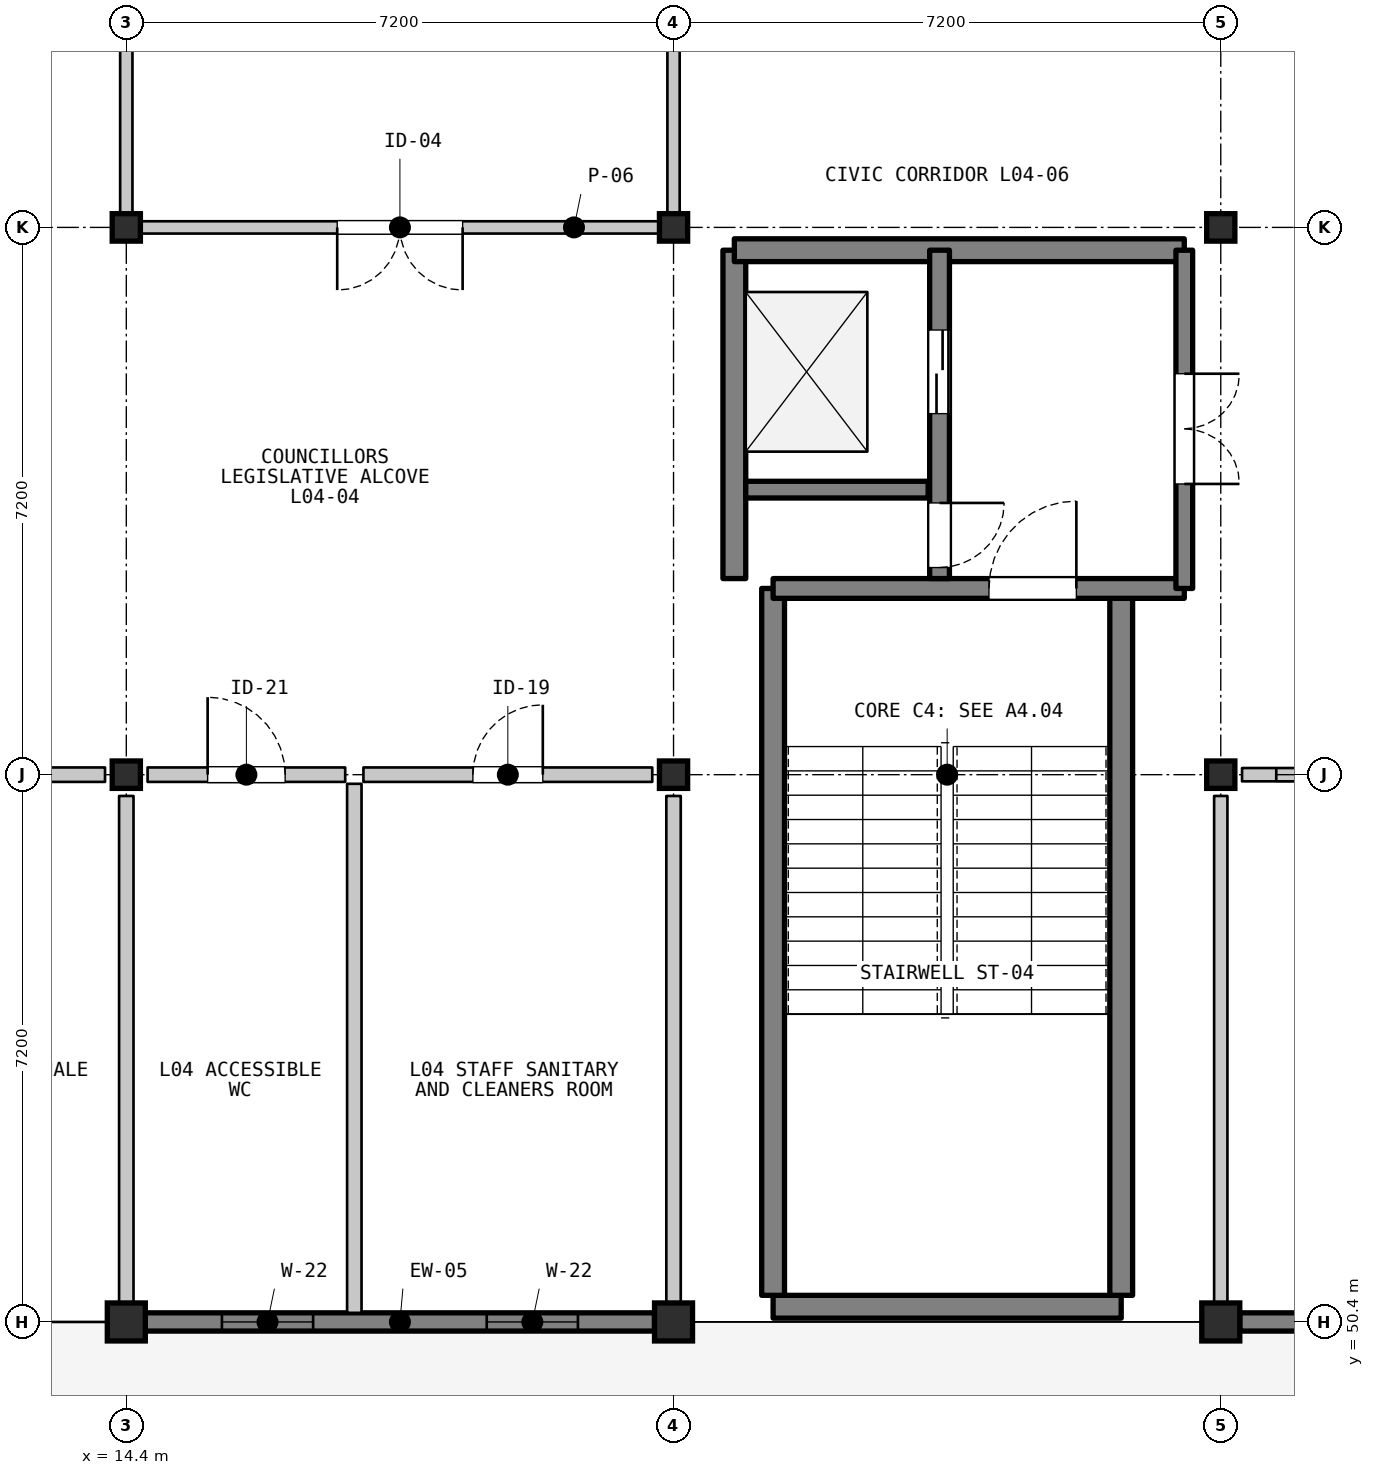
"""IFC4 building model, lengths in metres.
Left out: names, types, materials, properties, quantities, classifications, styles, units other than length and angle.
Written with IfcOpenShell. Run it as: python <this file> out.ifc"""

import sys

from ifc_helpers import new_model, si_unit, direction, frame, frame_2d, origin, origin_2d, place, context, subcontext, project, spatial, rectangle, i_section, extrude, element, fill, save


model = new_model("IFC4")
c1 = context("Model", 3, precision=1e-05, world=origin(), true_north=direction((0.0, 1.0)))
c2 = subcontext(c1, "Body", "Model", "MODEL_VIEW")
j1 = project(units=[si_unit("LENGTHUNIT", "METRE"), si_unit("PLANEANGLEUNIT", "RADIAN")], contexts=[c1])
p1 = place(None, origin())
s1 = spatial("IfcSite", under=j1, at=p1, CompositionType="ELEMENT")
p2 = place(p1, origin())
s2 = spatial("IfcBuilding", under=s1, at=p2, CompositionType="ELEMENT")
p3 = place(p2, frame((0.0, 0.0, 14.1)))
s3 = spatial("IfcBuildingStorey", under=s2, at=p3, CompositionType="ELEMENT", Elevation=14.1)
p4 = place(p3, frame((14.4, 50.4, 0.0), z_axis=(0.0, 0.0, 1.0), x_axis=(1.0, 0.0, 0.0)))
e1 = element("IfcColumn", 1, at=p4, inside=s3, PredefinedType="COLUMN", context=c2, shape_type="SweptSolid", body=[
    extrude(rectangle(XDim=0.5, YDim=0.5, at=origin_2d()), origin(), (0.0, 0.0, 1.0), 3.9),
])
for number, where, z_axis, x_axis in (
    (2, (14.4, 57.6, 0.0), (0.0, 0.0, 1.0), (1.0, 0.0, 0.0)),
    (3, (14.4, 64.8, 0.0), (0.0, 0.0, 1.0), (1.0, 0.0, 0.0)),
):
    element("IfcColumn", number, at=place(p3, frame(where, z_axis=z_axis, x_axis=x_axis)), inside=s3, PredefinedType="COLUMN", context=c2, shape_type="SweptSolid", body=[
        extrude(i_section(OverallWidth=0.371, OverallDepth=0.361, WebThickness=0.012, FlangeThickness=0.02, FilletRadius=0.015, at=origin_2d()), origin(), (0.0, 0.0, 1.0), 3.9),
    ])
p5 = place(p3, frame((21.6, 50.4, 0.0), z_axis=(0.0, 0.0, 1.0), x_axis=(1.0, 0.0, 0.0)))
e4 = element("IfcColumn", 4, at=p5, inside=s3, PredefinedType="COLUMN", context=c2, shape_type="SweptSolid", body=[
    extrude(rectangle(XDim=0.5, YDim=0.5, at=origin_2d()), origin(), (0.0, 0.0, 1.0), 3.9),
])
for number, where, z_axis, x_axis in (
    (5, (21.6, 57.6, 0.0), (0.0, 0.0, 1.0), (1.0, 0.0, 0.0)),
    (6, (21.6, 64.8, 0.0), (0.0, 0.0, 1.0), (1.0, 0.0, 0.0)),
):
    element("IfcColumn", number, at=place(p3, frame(where, z_axis=z_axis, x_axis=x_axis)), inside=s3, PredefinedType="COLUMN", context=c2, shape_type="SweptSolid", body=[
        extrude(i_section(OverallWidth=0.371, OverallDepth=0.361, WebThickness=0.012, FlangeThickness=0.02, FilletRadius=0.015, at=origin_2d()), origin(), (0.0, 0.0, 1.0), 3.9),
    ])
p6 = place(p3, frame((28.8, 50.4, 0.0), z_axis=(0.0, 0.0, 1.0), x_axis=(1.0, 0.0, 0.0)))
e7 = element("IfcColumn", 7, at=p6, inside=s3, PredefinedType="COLUMN", context=c2, shape_type="SweptSolid", body=[
    extrude(rectangle(XDim=0.5, YDim=0.5, at=origin_2d()), origin(), (0.0, 0.0, 1.0), 3.9),
])
for number, where, z_axis, x_axis in (
    (8, (28.8, 57.6, 0.0), (0.0, 0.0, 1.0), (1.0, 0.0, 0.0)),
    (9, (28.8, 64.8, 0.0), (0.0, 0.0, 1.0), (1.0, 0.0, 0.0)),
):
    element("IfcColumn", number, at=place(p3, frame(where, z_axis=z_axis, x_axis=x_axis)), inside=s3, PredefinedType="COLUMN", context=c2, shape_type="SweptSolid", body=[
        extrude(i_section(OverallWidth=0.371, OverallDepth=0.361, WebThickness=0.012, FlangeThickness=0.02, FilletRadius=0.015, at=origin_2d()), origin(), (0.0, 0.0, 1.0), 3.9),
    ])
p7 = place(p3, frame((21.35, 50.4, 0.0), z_axis=(0.0, 0.0, 1.0), x_axis=(-1.0, 0.0, 0.0)))
e10 = element("IfcWall", 10, at=p7, inside=s3, PredefinedType="SOLIDWALL", context=c2, shape_type="SweptSolid", body=[
    extrude(rectangle(XDim=6.7, YDim=0.24, at=frame_2d((3.35, 0.0))), origin(), (0.0, 0.0, 1.0), 3.118),
])
p8 = place(p7, frame((1.008, 0.0, 0.95)))
e11 = element("IfcOpeningElement", 11, at=p8, cuts=e10, PredefinedType="OPENING", context=c2, shape_type="SweptSolid", body=[
    extrude(rectangle(XDim=1.2, YDim=1.7, at=frame_2d((0.6, 0.85))), frame((0.0, 0.13, 0.0), z_axis=(0.0, -1.0, 0.0), x_axis=(1.0, 0.0, 0.0)), (0.0, 0.0, 1.0), 0.26),
])
p9 = place(p7, frame((4.492, 0.0, 0.95)))
e12 = element("IfcOpeningElement", 12, at=p9, cuts=e10, PredefinedType="OPENING", context=c2, shape_type="SweptSolid", body=[
    extrude(rectangle(XDim=1.2, YDim=1.7, at=frame_2d((0.6, 0.85))), frame((0.0, 0.13, 0.0), z_axis=(0.0, -1.0, 0.0), x_axis=(1.0, 0.0, 0.0)), (0.0, 0.0, 1.0), 0.26),
])
p10 = place(p3, frame((35.75, 50.4, 0.0), z_axis=(0.0, 0.0, 1.0), x_axis=(-1.0, 0.0, 0.0)))
e13 = element("IfcWall", 13, at=p10, inside=s3, PredefinedType="SOLIDWALL", context=c2, shape_type="SweptSolid", body=[
    extrude(rectangle(XDim=6.7, YDim=0.24, at=frame_2d((3.35, 0.0))), origin(), (0.0, 0.0, 1.0), 3.118),
])
p11 = place(p3, frame((22.91, 50.6, 0.0), z_axis=(0.0, 0.0, 1.0), x_axis=(1.0, 0.0, 0.0)))
e14 = element("IfcWall", 14, at=p11, inside=s3, PredefinedType="SHEAR", context=c2, shape_type="SweptSolid", body=[
    extrude(rectangle(XDim=4.58, YDim=0.3, at=frame_2d((2.29, 0.0))), origin(), (0.0, 0.0, 1.0), 3.72),
])
for number, where, z_axis, x_axis in (
    (15, (22.91, 50.75, 0.0), (0.0, 0.0, 1.0), (0.0, 1.0, 0.0)),
    (16, (27.49, 50.75, 0.0), (0.0, 0.0, 1.0), (0.0, 1.0, 0.0)),
):
    element("IfcWall", number, at=place(p3, frame(where, z_axis=z_axis, x_axis=x_axis)), inside=s3, PredefinedType="SHEAR", context=c2, shape_type="SweptSolid", body=[
        extrude(rectangle(XDim=9.3, YDim=0.3, at=frame_2d((4.65, 0.0))), origin(), (0.0, 0.0, 1.0), 3.72),
    ])
p12 = place(p3, frame((22.91, 60.05, 0.0), z_axis=(0.0, 0.0, 1.0), x_axis=(1.0, 0.0, 0.0)))
e17 = element("IfcWall", 17, at=p12, inside=s3, PredefinedType="SHEAR", context=c2, shape_type="SweptSolid", body=[
    extrude(rectangle(XDim=5.41, YDim=0.26, at=frame_2d((2.705, 0.0))), origin(), (0.0, 0.0, 1.0), 3.72),
])
p13 = place(p12, frame((2.84, 0.0, 0.0)))
e18 = element("IfcOpeningElement", 18, at=p13, cuts=e17, PredefinedType="OPENING", context=c2, shape_type="SweptSolid", body=[
    extrude(rectangle(XDim=1.15, YDim=2.15, at=frame_2d((0.575, 1.075))), frame((0.0, 0.14, 0.0), z_axis=(0.0, -1.0, 0.0), x_axis=(1.0, 0.0, 0.0)), (0.0, 0.0, 1.0), 0.28),
])
p14 = place(p3, frame((22.4, 60.18, 0.0), z_axis=(0.0, 0.0, 1.0), x_axis=(0.0, 1.0, 0.0)))
e19 = element("IfcWall", 19, at=p14, inside=s3, PredefinedType="SHEAR", context=c2, shape_type="SweptSolid", body=[
    extrude(rectangle(XDim=4.32, YDim=0.3, at=frame_2d((2.16, 0.0))), origin(), (0.0, 0.0, 1.0), 3.72),
])
p15 = place(p3, frame((22.4, 64.5, 0.0), z_axis=(0.0, 0.0, 1.0), x_axis=(1.0, 0.0, 0.0)))
e20 = element("IfcWall", 20, at=p15, inside=s3, PredefinedType="SHEAR", context=c2, shape_type="SweptSolid", body=[
    extrude(rectangle(XDim=5.92, YDim=0.3, at=frame_2d((2.96, 0.0))), origin(), (0.0, 0.0, 1.0), 3.72),
])
p16 = place(p3, frame((22.55, 61.35, 0.0), z_axis=(0.0, 0.0, 1.0), x_axis=(1.0, 0.0, 0.0)))
e21 = element("IfcWall", 21, at=p16, inside=s3, PredefinedType="SHEAR", context=c2, shape_type="SweptSolid", body=[
    extrude(rectangle(XDim=2.4, YDim=0.22, at=frame_2d((1.2, 0.0))), origin(), (0.0, 0.0, 1.0), 3.72),
])
p17 = place(p3, frame((25.1, 64.5, 0.0), z_axis=(0.0, 0.0, 1.0), x_axis=(0.0, -1.0, 0.0)))
e22 = element("IfcWall", 22, at=p17, inside=s3, PredefinedType="SHEAR", context=c2, shape_type="SweptSolid", body=[
    extrude(rectangle(XDim=4.32, YDim=0.26, at=frame_2d((2.16, 0.0))), origin(), (0.0, 0.0, 1.0), 3.72),
])
p18 = place(p17, frame((1.05, 0.0, 0.0)))
e23 = element("IfcOpeningElement", 23, at=p18, cuts=e22, PredefinedType="OPENING", context=c2, shape_type="SweptSolid", body=[
    extrude(rectangle(XDim=1.1, YDim=2.15, at=frame_2d((0.55, 1.075))), frame((0.0, 0.14, 0.0), z_axis=(0.0, -1.0, 0.0), x_axis=(1.0, 0.0, 0.0)), (0.0, 0.0, 1.0), 0.28),
])
p19 = place(p17, frame((3.325, 0.0, 0.0)))
e24 = element("IfcOpeningElement", 24, at=p19, cuts=e22, PredefinedType="OPENING", context=c2, shape_type="SweptSolid", body=[
    extrude(rectangle(XDim=0.85, YDim=2.05, at=frame_2d((0.425, 1.025))), frame((0.0, 0.14, 0.0), z_axis=(0.0, -1.0, 0.0), x_axis=(1.0, 0.0, 0.0)), (0.0, 0.0, 1.0), 0.28),
])
p20 = place(p3, frame((28.32, 64.5, 0.0), z_axis=(0.0, 0.0, 1.0), x_axis=(0.0, -1.0, 0.0)))
e25 = element("IfcWall", 25, at=p20, inside=s3, PredefinedType="SHEAR", context=c2, shape_type="SweptSolid", body=[
    extrude(rectangle(XDim=4.45, YDim=0.22, at=frame_2d((2.225, 0.0))), origin(), (0.0, 0.0, 1.0), 3.72),
])
p21 = place(p20, frame((1.625, 0.0, 0.0)))
e26 = element("IfcOpeningElement", 26, at=p21, cuts=e25, PredefinedType="OPENING", context=c2, shape_type="SweptSolid", body=[
    extrude(rectangle(XDim=1.45, YDim=2.2, at=frame_2d((0.725, 1.1))), frame((0.0, 0.12, 0.0), z_axis=(0.0, -1.0, 0.0), x_axis=(1.0, 0.0, 0.0)), (0.0, 0.0, 1.0), 0.24),
])
p22 = place(p3, frame((10.92, 57.6, 0.0), z_axis=(0.0, 0.0, 1.0), x_axis=(1.0, 0.0, 0.0)))
e27 = element("IfcWall", 27, at=p22, inside=s3, PredefinedType="PARTITIONING", context=c2, shape_type="SweptSolid", body=[
    extrude(rectangle(XDim=3.2, YDim=0.19, at=frame_2d((1.6, 0.0))), origin(), (0.0, 0.0, 1.0), 3.088),
])
p23 = place(p22, frame((1.14, 0.0, 0.0)))
e28 = element("IfcOpeningElement", 28, at=p23, cuts=e27, PredefinedType="OPENING", context=c2, shape_type="SweptSolid", body=[
    extrude(rectangle(XDim=0.92, YDim=2.1, at=frame_2d((0.46, 1.05))), frame((0.0, 0.105, 0.0), z_axis=(0.0, -1.0, 0.0), x_axis=(1.0, 0.0, 0.0)), (0.0, 0.0, 1.0), 0.21),
])
p24 = place(p3, frame((14.4, 57.32, 0.0), z_axis=(0.0, 0.0, 1.0), x_axis=(0.0, -1.0, 0.0)))
e29 = element("IfcWall", 29, at=p24, inside=s3, PredefinedType="PARTITIONING", context=c2, shape_type="SweptSolid", body=[
    extrude(rectangle(XDim=6.8, YDim=0.19, at=frame_2d((3.4, 0.0))), origin(), (0.0, 0.0, 1.0), 3.088),
])
p25 = place(p3, frame((14.68, 57.6, 0.0), z_axis=(0.0, 0.0, 1.0), x_axis=(1.0, 0.0, 0.0)))
e30 = element("IfcWall", 30, at=p25, inside=s3, PredefinedType="PARTITIONING", context=c2, shape_type="SweptSolid", body=[
    extrude(rectangle(XDim=2.6, YDim=0.19, at=frame_2d((1.3, 0.0))), origin(), (0.0, 0.0, 1.0), 3.108),
])
p26 = place(p25, frame((0.79, 0.0, 0.0)))
e31 = element("IfcOpeningElement", 31, at=p26, cuts=e30, PredefinedType="OPENING", context=c2, shape_type="SweptSolid", body=[
    extrude(rectangle(XDim=1.02, YDim=2.15, at=frame_2d((0.51, 1.075))), frame((0.0, 0.105, 0.0), z_axis=(0.0, -1.0, 0.0), x_axis=(1.0, 0.0, 0.0)), (0.0, 0.0, 1.0), 0.21),
])
p27 = place(p3, frame((17.4, 57.48, 0.0), z_axis=(0.0, 0.0, 1.0), x_axis=(0.0, -1.0, 0.0)))
e32 = element("IfcWall", 32, at=p27, inside=s3, PredefinedType="PARTITIONING", context=c2, shape_type="SweptSolid", body=[
    extrude(rectangle(XDim=6.96, YDim=0.19, at=frame_2d((3.48, 0.0))), origin(), (0.0, 0.0, 1.0), 3.108),
])
p28 = place(p3, frame((17.52, 57.6, 0.0), z_axis=(0.0, 0.0, 1.0), x_axis=(1.0, 0.0, 0.0)))
e33 = element("IfcWall", 33, at=p28, inside=s3, PredefinedType="PARTITIONING", context=c2, shape_type="SweptSolid", body=[
    extrude(rectangle(XDim=3.8, YDim=0.19, at=frame_2d((1.9, 0.0))), origin(), (0.0, 0.0, 1.0), 3.108),
])
p29 = place(p28, frame((1.44, 0.0, 0.0)))
e34 = element("IfcOpeningElement", 34, at=p29, cuts=e33, PredefinedType="OPENING", context=c2, shape_type="SweptSolid", body=[
    extrude(rectangle(XDim=0.92, YDim=2.1, at=frame_2d((0.46, 1.05))), frame((0.0, 0.105, 0.0), z_axis=(0.0, -1.0, 0.0), x_axis=(1.0, 0.0, 0.0)), (0.0, 0.0, 1.0), 0.21),
])
p30 = place(p3, frame((21.6, 57.32, 0.0), z_axis=(0.0, 0.0, 1.0), x_axis=(0.0, -1.0, 0.0)))
e35 = element("IfcWall", 35, at=p30, inside=s3, PredefinedType="PARTITIONING", context=c2, shape_type="SweptSolid", body=[
    extrude(rectangle(XDim=6.8, YDim=0.19, at=frame_2d((3.4, 0.0))), origin(), (0.0, 0.0, 1.0), 3.108),
])
p31 = place(p3, frame((21.48, 64.8, 0.0), z_axis=(0.0, 0.0, 1.0), x_axis=(-1.0, 0.0, 0.0)))
e36 = element("IfcWall", 36, at=p31, inside=s3, PredefinedType="PARTITIONING", context=c2, shape_type="SweptSolid", body=[
    extrude(rectangle(XDim=6.96, YDim=0.162, at=frame_2d((3.48, 0.0))), origin(), (0.0, 0.0, 1.0), 3.108),
])
p32 = place(p31, frame((2.655, 0.0, 0.0)))
e37 = element("IfcOpeningElement", 37, at=p32, cuts=e36, PredefinedType="OPENING", context=c2, shape_type="SweptSolid", body=[
    extrude(rectangle(XDim=1.65, YDim=2.35, at=frame_2d((0.825, 1.175))), frame((0.0, 0.091, 0.0), z_axis=(0.0, -1.0, 0.0), x_axis=(1.0, 0.0, 0.0)), (0.0, 0.0, 1.0), 0.182),
])
p33 = place(p3, frame((14.4, 64.92, 0.0), z_axis=(0.0, 0.0, 1.0), x_axis=(0.0, 1.0, 0.0)))
e38 = element("IfcWall", 38, at=p33, inside=s3, PredefinedType="PARTITIONING", context=c2, shape_type="SweptSolid", body=[
    extrude(rectangle(XDim=6.96, YDim=0.162, at=frame_2d((3.48, 0.0))), origin(), (0.0, 0.0, 1.0), 3.088),
])
p34 = place(p3, frame((21.6, 71.88, 0.0), z_axis=(0.0, 0.0, 1.0), x_axis=(0.0, -1.0, 0.0)))
e39 = element("IfcWall", 39, at=p34, inside=s3, PredefinedType="PARTITIONING", context=c2, shape_type="SweptSolid", body=[
    extrude(rectangle(XDim=6.96, YDim=0.162, at=frame_2d((3.48, 0.0))), origin(), (0.0, 0.0, 1.0), 3.108),
])
p35 = place(p3, frame((29.08, 57.6, 0.0), z_axis=(0.0, 0.0, 1.0), x_axis=(1.0, 0.0, 0.0)))
e40 = element("IfcWall", 40, at=p35, inside=s3, PredefinedType="PARTITIONING", context=c2, shape_type="SweptSolid", body=[
    extrude(rectangle(XDim=6.8, YDim=0.175, at=frame_2d((3.4, 0.0))), origin(), (0.0, 0.0, 1.0), 3.108),
])
p36 = place(p35, frame((2.87, 0.0, 0.0)))
e41 = element("IfcOpeningElement", 41, at=p36, cuts=e40, PredefinedType="OPENING", context=c2, shape_type="SweptSolid", body=[
    extrude(rectangle(XDim=1.06, YDim=2.18, at=frame_2d((0.53, 1.09))), frame((0.0, 0.097, 0.0), z_axis=(0.0, -1.0, 0.0), x_axis=(1.0, 0.0, 0.0)), (0.0, 0.0, 1.0), 0.195),
])
p37 = place(p35, frame((0.45, 0.0, 1.05)))
e42 = element("IfcOpeningElement", 42, at=p37, cuts=e40, PredefinedType="OPENING", context=c2, shape_type="SweptSolid", body=[
    extrude(rectangle(XDim=2.12, YDim=1.06, at=frame_2d((1.06, 0.53))), frame((0.0, 0.097, 0.0), z_axis=(0.0, -1.0, 0.0), x_axis=(1.0, 0.0, 0.0)), (0.0, 0.0, 1.0), 0.195),
])
p38 = place(p3, frame((28.8, 50.52, 0.0), z_axis=(0.0, 0.0, 1.0), x_axis=(0.0, 1.0, 0.0)))
e43 = element("IfcWall", 43, at=p38, inside=s3, PredefinedType="PARTITIONING", context=c2, shape_type="SweptSolid", body=[
    extrude(rectangle(XDim=6.8, YDim=0.175, at=frame_2d((3.4, 0.0))), origin(), (0.0, 0.0, 1.0), 3.108),
])
p39 = place(p8, origin())
e44 = element("IfcWindow", 44, at=p39, inside=s3, PartitioningType="SINGLE_PANEL", PredefinedType="WINDOW", context=c2, shape_type="SweptSolid", body=[
    extrude(rectangle(XDim=1.2, YDim=1.7, at=frame_2d((0.6, 0.85))), frame((0.0, 0.03, 0.0), z_axis=(0.0, -1.0, 0.0), x_axis=(1.0, 0.0, 0.0)), (0.0, 0.0, 1.0), 0.06),
])
fill(e11, e44)
p40 = place(p9, origin())
e45 = element("IfcWindow", 45, at=p40, inside=s3, PartitioningType="SINGLE_PANEL", PredefinedType="WINDOW", context=c2, shape_type="SweptSolid", body=[
    extrude(rectangle(XDim=1.2, YDim=1.7, at=frame_2d((0.6, 0.85))), frame((0.0, 0.03, 0.0), z_axis=(0.0, -1.0, 0.0), x_axis=(1.0, 0.0, 0.0)), (0.0, 0.0, 1.0), 0.06),
])
fill(e12, e45)
p41 = place(p13, origin())
e46 = element("IfcDoor", 46, at=p41, inside=s3, OperationType="SINGLE_SWING_RIGHT", PredefinedType="DOOR", context=c2, shape_type="SweptSolid", body=[
    extrude(rectangle(XDim=1.15, YDim=2.15, at=frame_2d((0.575, 1.075))), frame((0.0, 0.025, 0.0), z_axis=(0.0, -1.0, 0.0), x_axis=(1.0, 0.0, 0.0)), (0.0, 0.0, 1.0), 0.05),
])
fill(e18, e46)
p42 = place(p18, origin())
e47 = element("IfcDoor", 47, at=p42, inside=s3, OperationType="DOUBLE_DOOR_SLIDING", PredefinedType="DOOR", context=c2, shape_type="SweptSolid", body=[
    extrude(rectangle(XDim=1.1, YDim=2.15, at=frame_2d((0.55, 1.075))), frame((0.0, 0.025, 0.0), z_axis=(0.0, -1.0, 0.0), x_axis=(1.0, 0.0, 0.0)), (0.0, 0.0, 1.0), 0.05),
])
fill(e23, e47)
p43 = place(p19, origin())
e48 = element("IfcDoor", 48, at=p43, inside=s3, OperationType="SINGLE_SWING_LEFT", PredefinedType="DOOR", context=c2, shape_type="SweptSolid", body=[
    extrude(rectangle(XDim=0.85, YDim=2.05, at=frame_2d((0.425, 1.025))), frame((0.0, 0.025, 0.0), z_axis=(0.0, -1.0, 0.0), x_axis=(1.0, 0.0, 0.0)), (0.0, 0.0, 1.0), 0.05),
])
fill(e24, e48)
p44 = place(p21, origin())
e49 = element("IfcDoor", 49, at=p44, inside=s3, OperationType="DOUBLE_DOOR_SINGLE_SWING", PredefinedType="DOOR", context=c2, shape_type="SweptSolid", body=[
    extrude(rectangle(XDim=1.45, YDim=2.2, at=frame_2d((0.725, 1.1))), frame((0.0, 0.025, 0.0), z_axis=(0.0, -1.0, 0.0), x_axis=(1.0, 0.0, 0.0)), (0.0, 0.0, 1.0), 0.05),
])
fill(e26, e49)
p45 = place(p26, origin())
e50 = element("IfcDoor", 50, at=p45, inside=s3, OperationType="SINGLE_SWING_LEFT", PredefinedType="DOOR", context=c2, shape_type="SweptSolid", body=[
    extrude(rectangle(XDim=1.02, YDim=2.15, at=frame_2d((0.51, 1.075))), frame((0.0, 0.025, 0.0), z_axis=(0.0, -1.0, 0.0), x_axis=(1.0, 0.0, 0.0)), (0.0, 0.0, 1.0), 0.05),
])
fill(e31, e50)
p46 = place(p29, origin())
e51 = element("IfcDoor", 51, at=p46, inside=s3, OperationType="SINGLE_SWING_RIGHT", PredefinedType="DOOR", context=c2, shape_type="SweptSolid", body=[
    extrude(rectangle(XDim=0.92, YDim=2.1, at=frame_2d((0.46, 1.05))), frame((0.0, 0.025, 0.0), z_axis=(0.0, -1.0, 0.0), x_axis=(1.0, 0.0, 0.0)), (0.0, 0.0, 1.0), 0.05),
])
fill(e34, e51)
p47 = place(p32, origin())
e52 = element("IfcDoor", 52, at=p47, inside=s3, OperationType="DOUBLE_DOOR_SINGLE_SWING", PredefinedType="DOOR", context=c2, shape_type="SweptSolid", body=[
    extrude(rectangle(XDim=1.65, YDim=2.35, at=frame_2d((0.825, 1.175))), frame((0.0, 0.025, 0.0), z_axis=(0.0, -1.0, 0.0), x_axis=(1.0, 0.0, 0.0)), (0.0, 0.0, 1.0), 0.05),
])
fill(e37, e52)
p48 = place(p37, origin())
e53 = element("IfcWindow", 53, at=p48, inside=s3, PartitioningType="SINGLE_PANEL", PredefinedType="WINDOW", context=c2, shape_type="SweptSolid", body=[
    extrude(rectangle(XDim=2.12, YDim=1.06, at=frame_2d((1.06, 0.53))), frame((0.0, 0.03, 0.0), z_axis=(0.0, -1.0, 0.0), x_axis=(1.0, 0.0, 0.0)), (0.0, 0.0, 1.0), 0.06),
])
fill(e42, e53)
save(model, sys.argv[1])
